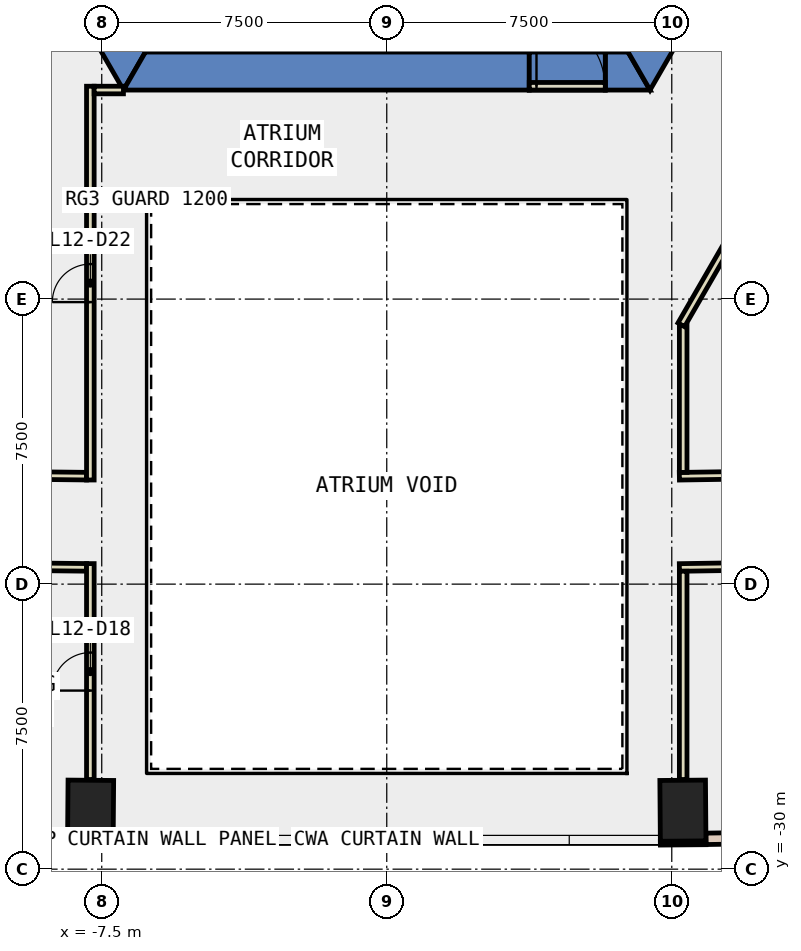
"""IFC4 building model, lengths in metres.
Left out: names, types, materials, properties, quantities, classifications, styles, units other than length and angle.
Written with IfcOpenShell. Run it as: python <this file> out.ifc"""

import sys

from ifc_helpers import new_model, si_unit, direction, frame, frame_2d, origin, origin_2d, place, context, subcontext, project, spatial, polyline, rectangle, outline, extrude, element, fill, save


model = new_model("IFC4")
c1 = context("Model", 3, precision=1e-05, world=origin(), true_north=direction((0.0, 1.0)))
c2 = subcontext(c1, "Body", "Model", "MODEL_VIEW")
j1 = project(units=[si_unit("LENGTHUNIT", "METRE"), si_unit("PLANEANGLEUNIT", "RADIAN")], contexts=[c1])
p1 = place(None, origin())
s1 = spatial("IfcSite", under=j1, at=p1, CompositionType="ELEMENT")
p2 = place(p1, origin())
s2 = spatial("IfcBuilding", under=s1, at=p2, CompositionType="ELEMENT")
p3 = place(p2, frame((0.0, 0.0, 60.2)))
s3 = spatial("IfcBuildingStorey", under=s2, at=p3, CompositionType="ELEMENT", Elevation=60.2)
for number, where, z_axis, x_axis in (
    (1, (-7.793, -28.461, -0.4), (0.0, 0.0, 1.0), (-1.0, 0.008, 0.0)),
    (2, (7.793, -28.461, -0.4), (0.0, 0.0, 1.0), (1.0, 0.008, 0.0)),
):
    element("IfcColumn", number, at=place(p3, frame(where, z_axis=z_axis, x_axis=x_axis)), inside=s3, PredefinedType="COLUMN", context=c2, shape_type="SweptSolid", body=[
        extrude(rectangle(XDim=1.2, YDim=1.6, at=origin_2d()), origin(), (0.0, 0.0, 1.0), 4.2),
    ])
p4 = place(p3, frame((0.0, 0.0, -0.4)))
e3 = element("IfcWall", 3, at=p4, inside=s3, PredefinedType="SHEAR", context=c2, shape_type="SweptSolid", body=[
    extrude(outline(polyline([(-13.856, 2.5), (-6.928, -9.5), (-6.351, -8.5), (-12.702, 2.5), (-13.856, 2.5)])), origin(), (0.0, 0.0, 1.0), 4.2),
])
p5 = place(p3, frame((0.0, 0.0, -0.4)))
e4 = element("IfcWall", 4, at=p5, inside=s3, PredefinedType="SHEAR", context=c2, shape_type="SweptSolid", body=[
    extrude(outline(polyline([(3.75, -9.5), (3.75, -8.5), (-6.351, -8.5), (-6.928, -9.5), (3.75, -9.5)])), origin(), (0.0, 0.0, 1.0), 4.2),
])
p6 = place(p3, frame((0.0, 0.0, -0.4)))
e5 = element("IfcWall", 5, at=p6, inside=s3, PredefinedType="SHEAR", context=c2, shape_type="SweptSolid", body=[
    extrude(outline(polyline([(5.75, -8.5), (5.75, -9.5), (6.928, -9.5), (6.351, -8.5), (5.75, -8.5)])), origin(), (0.0, 0.0, 1.0), 4.2),
])
p7 = place(p3, frame((0.0, 0.0, 3.6)))
e6 = element("IfcWall", 6, at=p7, inside=s3, PredefinedType="SHEAR", context=c2, shape_type="SweptSolid", body=[
    extrude(outline(polyline([(5.75, -9.5), (5.75, -8.5), (3.75, -8.5), (3.75, -9.5), (5.75, -9.5)])), origin(), (0.0, 0.0, 1.0), 0.2),
])
p8 = place(p3, frame((0.0, 0.0, -0.4)))
e7 = element("IfcWall", 7, at=p8, inside=s3, PredefinedType="SHEAR", context=c2, shape_type="SweptSolid", body=[
    extrude(outline(polyline([(8.117, -7.44), (7.252, -6.94), (6.351, -8.5), (6.928, -9.5), (8.117, -7.44)])), origin(), (0.0, 0.0, 1.0), 4.2),
])
for number, where, z_axis, x_axis in (
    (8, (-8.4, -29.306, 0.0), (0.0, 0.0, 1.0), (1.0, -0.008, 0.0)),
    (9, (7.2, -29.316, 0.0), (0.0, 0.0, 1.0), (1.0, 0.008, 0.0)),
):
    element("IfcWall", number, at=place(p3, frame(where, z_axis=z_axis, x_axis=x_axis)), inside=s3, PredefinedType="STANDARD", context=c2, shape_type="SweptSolid", body=[
        extrude(rectangle(XDim=1.2, YDim=0.1, at=frame_2d((0.6, 0.0))), origin(), (0.0, 0.0, 1.0), 3.8),
    ])
p9 = place(p3, frame((-15.568, -29.125, 0.0), z_axis=(0.0, 0.0, 1.0), x_axis=(0.999939152594, -0.011031369316, 0.0)))
e10 = element("IfcWall", 10, at=p9, inside=s3, PredefinedType="STANDARD", context=c2, shape_type="SweptSolid", body=[
    extrude(rectangle(XDim=7.171, YDim=0.3, at=frame_2d((3.585, 0.0))), origin(), (0.0, 0.0, 1.0), 3.8),
])
p10 = place(p9, frame((0.593, 0.0, 0.9)))
e11 = element("IfcOpeningElement", 11, at=p10, cuts=e10, PredefinedType="OPENING", context=c2, shape_type="SweptSolid", body=[
    extrude(rectangle(XDim=2.4, YDim=2.6, at=frame_2d((1.2, 1.3))), frame((0.0, 0.16, 0.0), z_axis=(0.0, -1.0, 0.0), x_axis=(1.0, 0.0, 0.0)), (0.0, 0.0, 1.0), 0.32),
])
p11 = place(p9, frame((4.178, 0.0, 0.9)))
e12 = element("IfcOpeningElement", 12, at=p11, cuts=e10, PredefinedType="OPENING", context=c2, shape_type="SweptSolid", body=[
    extrude(rectangle(XDim=2.4, YDim=2.6, at=frame_2d((1.2, 1.3))), frame((0.0, 0.16, 0.0), z_axis=(0.0, -1.0, 0.0), x_axis=(1.0, 0.0, 0.0)), (0.0, 0.0, 1.0), 0.32),
])
p12 = place(p3, frame((8.398, -29.202, 0.0), z_axis=(0.0, 0.0, 1.0), x_axis=(0.99988053916, 0.015456629942, 0.0)))
e13 = element("IfcWall", 13, at=p12, inside=s3, PredefinedType="STANDARD", context=c2, shape_type="SweptSolid", body=[
    extrude(rectangle(XDim=7.171, YDim=0.3, at=frame_2d((3.585, 0.0))), origin(), (0.0, 0.0, 1.0), 3.8),
])
p13 = place(p12, frame((0.593, 0.0, 0.9)))
e14 = element("IfcOpeningElement", 14, at=p13, cuts=e13, PredefinedType="OPENING", context=c2, shape_type="SweptSolid", body=[
    extrude(rectangle(XDim=2.4, YDim=2.6, at=frame_2d((1.2, 1.3))), frame((0.0, 0.16, 0.0), z_axis=(0.0, -1.0, 0.0), x_axis=(1.0, 0.0, 0.0)), (0.0, 0.0, 1.0), 0.32),
])
p14 = place(p12, frame((4.178, 0.0, 0.9)))
e15 = element("IfcOpeningElement", 15, at=p14, cuts=e13, PredefinedType="OPENING", context=c2, shape_type="SweptSolid", body=[
    extrude(rectangle(XDim=2.4, YDim=2.6, at=frame_2d((1.2, 1.3))), frame((0.0, 0.16, 0.0), z_axis=(0.0, -1.0, 0.0), x_axis=(1.0, 0.0, 0.0)), (0.0, 0.0, 1.0), 0.32),
])
p15 = place(p3, frame((7.7, -19.661, 0.0), z_axis=(0.0, 0.0, 1.0), x_axis=(0.999882138464, 0.015352823245, 0.0)))
e16 = element("IfcWall", 16, at=p15, inside=s3, PredefinedType="PARTITIONING", context=c2, shape_type="SweptSolid", body=[
    extrude(rectangle(XDim=8.269, YDim=0.2, at=frame_2d((4.135, 0.0))), origin(), (0.0, 0.0, 1.0), 3.8),
])
p16 = place(p15, frame((3.235, 0.0, 0.0)))
e17 = element("IfcOpeningElement", 17, at=p16, cuts=e16, PredefinedType="OPENING", context=c2, shape_type="SweptSolid", body=[
    extrude(rectangle(XDim=1.8, YDim=2.1, at=frame_2d((0.9, 1.05))), frame((0.0, 0.11, 0.0), z_axis=(0.0, -1.0, 0.0), x_axis=(1.0, 0.0, 0.0)), (0.0, 0.0, 1.0), 0.22),
])
p17 = place(p3, frame((-9.776, -19.638, 0.0), z_axis=(0.0, 0.0, 1.0), x_axis=(0.999937374473, -0.011191386544, 0.0)))
e18 = element("IfcWall", 18, at=p17, inside=s3, PredefinedType="PARTITIONING", context=c2, shape_type="SweptSolid", body=[
    extrude(rectangle(XDim=1.876, YDim=0.2, at=frame_2d((0.938, 0.0))), origin(), (0.0, 0.0, 1.0), 3.8),
])
p18 = place(p3, frame((16.018, -21.933, 0.0), z_axis=(0.0, 0.0, 1.0), x_axis=(-0.999879942341, -0.015495189738, 0.0)))
e19 = element("IfcWall", 19, at=p18, inside=s3, PredefinedType="PARTITIONING", context=c2, shape_type="SweptSolid", body=[
    extrude(rectangle(XDim=8.319, YDim=0.2, at=frame_2d((4.16, 0.0))), origin(), (0.0, 0.0, 1.0), 3.8),
])
p19 = place(p18, frame((3.66, 0.0, 0.0)))
e20 = element("IfcOpeningElement", 20, at=p19, cuts=e19, PredefinedType="OPENING", context=c2, shape_type="SweptSolid", body=[
    extrude(rectangle(XDim=1.0, YDim=2.1, at=frame_2d((0.5, 1.05))), frame((0.0, 0.11, 0.0), z_axis=(0.0, -1.0, 0.0), x_axis=(1.0, 0.0, 0.0)), (0.0, 0.0, 1.0), 0.22),
])
p20 = place(p3, frame((-7.9, -22.059, 0.0), z_axis=(0.0, 0.0, 1.0), x_axis=(-0.999940210022, 0.010935098606, 0.0)))
e21 = element("IfcWall", 21, at=p20, inside=s3, PredefinedType="PARTITIONING", context=c2, shape_type="SweptSolid", body=[
    extrude(rectangle(XDim=3.929, YDim=0.2, at=frame_2d((1.965, 0.0))), origin(), (0.0, 0.0, 1.0), 3.8),
])
p21 = place(p3, frame((7.8, -15.69, 0.0), z_axis=(0.0, 0.0, 1.0), x_axis=(0.0, -1.0, 0.0)))
e22 = element("IfcWall", 22, at=p21, inside=s3, PredefinedType="PARTITIONING", context=c2, shape_type="SweptSolid", body=[
    extrude(rectangle(XDim=3.87, YDim=0.2, at=frame_2d((1.935, 0.0))), origin(), (0.0, 0.0, 1.0), 3.8),
])
p22 = place(p3, frame((-7.8, -19.76, 0.0), z_axis=(0.0, 0.0, 1.0), x_axis=(0.0, 1.0, 0.0)))
e23 = element("IfcWall", 23, at=p22, inside=s3, PredefinedType="PARTITIONING", context=c2, shape_type="SweptSolid", body=[
    extrude(rectangle(XDim=10.361, YDim=0.2, at=frame_2d((5.181, 0.0))), origin(), (0.0, 0.0, 1.0), 3.8),
])
p23 = place(p22, frame((4.681, 0.0, 0.0)))
e24 = element("IfcOpeningElement", 24, at=p23, cuts=e23, PredefinedType="OPENING", context=c2, shape_type="SweptSolid", body=[
    extrude(rectangle(XDim=1.0, YDim=2.1, at=frame_2d((0.5, 1.05))), frame((0.0, 0.11, 0.0), z_axis=(0.0, -1.0, 0.0), x_axis=(1.0, 0.0, 0.0)), (0.0, 0.0, 1.0), 0.22),
])
p24 = place(p3, frame((-7.7, -9.499, 0.0), z_axis=(0.0, 0.0, 1.0), x_axis=(1.0, 0.0, 0.0)))
e25 = element("IfcWall", 25, at=p24, inside=s3, PredefinedType="PARTITIONING", context=c2, shape_type="SweptSolid", body=[
    extrude(rectangle(XDim=0.771, YDim=0.2, at=frame_2d((0.385, 0.0))), origin(), (0.0, 0.0, 1.0), 3.8),
])
p25 = place(p3, frame((7.8, -22.16, 0.0), z_axis=(0.0, 0.0, 1.0), x_axis=(0.0, -1.0, 0.0)))
e26 = element("IfcWall", 26, at=p25, inside=s3, PredefinedType="PARTITIONING", context=c2, shape_type="SweptSolid", body=[
    extrude(rectangle(XDim=5.481, YDim=0.2, at=frame_2d((2.741, 0.0))), origin(), (0.0, 0.0, 1.0), 3.8),
])
p26 = place(p3, frame((-7.8, -27.641, 0.0), z_axis=(0.0, 0.0, 1.0), x_axis=(0.0, 1.0, 0.0)))
e27 = element("IfcWall", 27, at=p26, inside=s3, PredefinedType="PARTITIONING", context=c2, shape_type="SweptSolid", body=[
    extrude(rectangle(XDim=5.681, YDim=0.2, at=frame_2d((2.841, 0.0))), origin(), (0.0, 0.0, 1.0), 3.8),
])
p27 = place(p26, frame((2.34, 0.0, 0.0)))
e28 = element("IfcOpeningElement", 28, at=p27, cuts=e27, PredefinedType="OPENING", context=c2, shape_type="SweptSolid", body=[
    extrude(rectangle(XDim=1.0, YDim=2.1, at=frame_2d((0.5, 1.05))), frame((0.0, 0.11, 0.0), z_axis=(0.0, -1.0, 0.0), x_axis=(1.0, 0.0, 0.0)), (0.0, 0.0, 1.0), 0.22),
])
p28 = place(p3, frame((3.75, -9.4, 0.0), z_axis=(0.0, 0.0, 1.0), x_axis=(1.0, 0.0, 0.0)))
e29 = element("IfcWall", 29, at=p28, inside=s3, PredefinedType="PARTITIONING", context=c2, shape_type="SweptSolid", body=[
    extrude(rectangle(XDim=2.0, YDim=0.2, at=frame_2d((1.0, 0.0))), origin(), (0.0, 0.0, 1.0), 2.4),
])
p29 = place(p28, frame((0.19, 0.0, 0.0)))
e30 = element("IfcOpeningElement", 30, at=p29, cuts=e29, PredefinedType="OPENING", context=c2, shape_type="SweptSolid", body=[
    extrude(rectangle(XDim=1.8, YDim=2.1, at=frame_2d((0.9, 1.05))), frame((0.0, 0.11, 0.0), z_axis=(0.0, -1.0, 0.0), x_axis=(1.0, 0.0, 0.0)), (0.0, 0.0, 1.0), 0.22),
])
p30 = place(p3, frame((12.401, -7.622, 0.0), z_axis=(0.0, 0.0, 1.0), x_axis=(-0.500029185841, -0.866008552675, 0.0)))
e31 = element("IfcWall", 31, at=p30, inside=s3, PredefinedType="PARTITIONING", context=c2, shape_type="SweptSolid", body=[
    extrude(rectangle(XDim=9.301, YDim=0.2, at=frame_2d((4.651, 0.0))), origin(), (0.0, 0.0, 1.0), 3.8),
])
p31 = place(p27, origin())
e32 = element("IfcDoor", 32, at=p31, inside=s3, OperationType="SINGLE_SWING_LEFT", PredefinedType="DOOR", context=c2, shape_type="SweptSolid", body=[
    extrude(rectangle(XDim=1.0, YDim=2.1, at=frame_2d((0.5, 1.05))), frame((0.0, 0.025, 0.0), z_axis=(0.0, -1.0, 0.0), x_axis=(1.0, 0.0, 0.0)), (0.0, 0.0, 1.0), 0.05),
])
fill(e28, e32)
p32 = place(p23, origin())
e33 = element("IfcDoor", 33, at=p32, inside=s3, OperationType="SINGLE_SWING_LEFT", PredefinedType="DOOR", context=c2, shape_type="SweptSolid", body=[
    extrude(rectangle(XDim=1.0, YDim=2.1, at=frame_2d((0.5, 1.05))), frame((0.0, 0.025, 0.0), z_axis=(0.0, -1.0, 0.0), x_axis=(1.0, 0.0, 0.0)), (0.0, 0.0, 1.0), 0.05),
])
fill(e24, e33)
p33 = place(p29, origin())
e34 = element("IfcDoor", 34, at=p33, inside=s3, OperationType="DOUBLE_DOOR_SINGLE_SWING", PredefinedType="DOOR", context=c2, shape_type="SweptSolid", body=[
    extrude(rectangle(XDim=1.8, YDim=2.1, at=frame_2d((0.9, 1.05))), frame((0.0, 0.025, 0.0), z_axis=(0.0, -1.0, 0.0), x_axis=(1.0, 0.0, 0.0)), (0.0, 0.0, 1.0), 0.05),
])
fill(e30, e34)
save(model, sys.argv[1])
